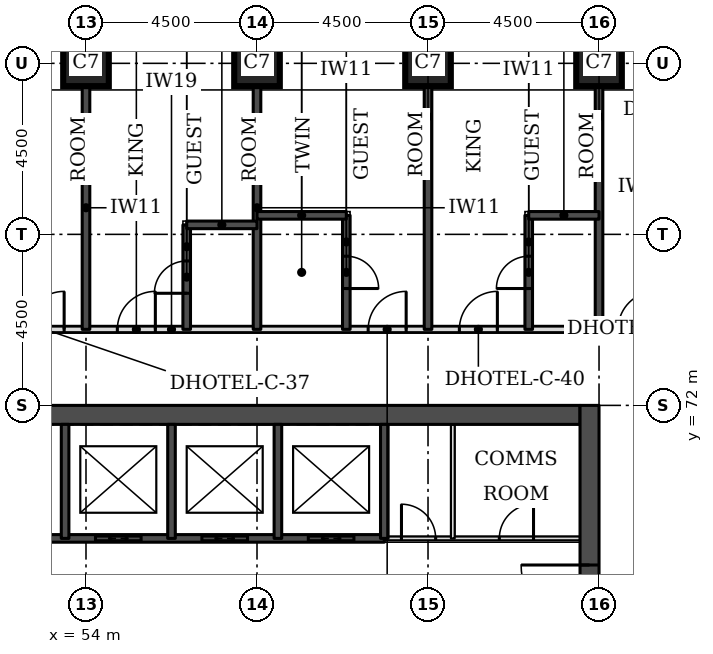
"""IFC4 building model, lengths in metres.
Left out: names, types, materials, properties, quantities, classifications, styles, units other than length and angle.
Written with IfcOpenShell. Run it as: python <this file> out.ifc"""

import sys

from ifc_helpers import new_model, si_unit, direction, frame, frame_2d, origin, origin_2d, place, context, subcontext, project, spatial, rectangle, extrude, element, fill, save


model = new_model("IFC4")
c1 = context("Model", 3, precision=1e-05, world=origin(), true_north=direction((0.0, 1.0)))
c2 = subcontext(c1, "Body", "Model", "MODEL_VIEW")
j1 = project(units=[si_unit("LENGTHUNIT", "METRE"), si_unit("PLANEANGLEUNIT", "RADIAN")], contexts=[c1])
p1 = place(None, origin())
s1 = spatial("IfcSite", under=j1, at=p1, CompositionType="ELEMENT")
p2 = place(p1, origin())
s2 = spatial("IfcBuilding", under=s1, at=p2, CompositionType="ELEMENT")
p3 = place(p2, frame((0.0, 0.0, 33.0)))
s3 = spatial("IfcBuildingStorey", under=s2, at=p3, CompositionType="ELEMENT", Elevation=33.0)
for number, where, z_axis, x_axis in (
    (1, (54.0, 81.0, 0.0), (0.0, 0.0, 1.0), (1.0, 0.0, 0.0)),
    (2, (58.5, 81.0, 0.0), (0.0, 0.0, 1.0), (1.0, 0.0, 0.0)),
    (3, (63.0, 81.0, 0.0), (0.0, 0.0, 1.0), (1.0, 0.0, 0.0)),
    (4, (67.5, 81.0, 0.0), (0.0, 0.0, 1.0), (1.0, 0.0, 0.0)),
):
    element("IfcColumn", number, at=place(p3, frame(where, z_axis=z_axis, x_axis=x_axis)), inside=s3, PredefinedType="COLUMN", context=c2, shape_type="SweptSolid", body=[
        extrude(rectangle(XDim=1.2, YDim=1.2, at=origin_2d()), origin(), (0.0, 0.0, 1.0), 3.3),
    ])
p4 = place(p3, frame((45.5, 71.75, 0.0), z_axis=(0.0, 0.0, 1.0), x_axis=(1.0, 0.0, 0.0)))
e5 = element("IfcWall", 5, at=p4, inside=s3, PredefinedType="SHEAR", context=c2, shape_type="SweptSolid", body=[
    extrude(rectangle(XDim=21.5, YDim=0.5, at=frame_2d((10.75, 0.0))), origin(), (0.0, 0.0, 1.0), 3.3),
])
p5 = place(p3, frame((67.25, 49.5, 0.0), z_axis=(0.0, 0.0, 1.0), x_axis=(0.0, 1.0, 0.0)))
e6 = element("IfcWall", 6, at=p5, inside=s3, PredefinedType="SHEAR", context=c2, shape_type="SweptSolid", body=[
    extrude(rectangle(XDim=22.5, YDim=0.5, at=frame_2d((11.25, 0.0))), origin(), (0.0, 0.0, 1.0), 3.3),
])
p6 = place(p5, frame((4.2, 0.0, 0.0)))
e7 = element("IfcOpeningElement", 7, at=p6, cuts=e6, PredefinedType="OPENING", context=c2, shape_type="SweptSolid", body=[
    extrude(rectangle(XDim=1.8, YDim=2.1, at=frame_2d((0.9, 1.05))), frame((0.0, 0.26, 0.0), z_axis=(0.0, -1.0, 0.0), x_axis=(1.0, 0.0, 0.0)), (0.0, 0.0, 1.0), 0.52),
])
p7 = place(p5, frame((6.9, 0.0, 0.0)))
e8 = element("IfcOpeningElement", 8, at=p7, cuts=e6, PredefinedType="OPENING", context=c2, shape_type="SweptSolid", body=[
    extrude(rectangle(XDim=1.1, YDim=2.1, at=frame_2d((0.55, 1.05))), frame((0.0, 0.26, 0.0), z_axis=(0.0, -1.0, 0.0), x_axis=(1.0, 0.0, 0.0)), (0.0, 0.0, 1.0), 0.52),
])
p8 = place(p5, frame((13.6, 0.0, 0.0)))
e9 = element("IfcOpeningElement", 9, at=p8, cuts=e6, PredefinedType="OPENING", context=c2, shape_type="SweptSolid", body=[
    extrude(rectangle(XDim=1.1, YDim=2.1, at=frame_2d((0.55, 1.05))), frame((0.0, 0.26, 0.0), z_axis=(0.0, -1.0, 0.0), x_axis=(1.0, 0.0, 0.0)), (0.0, 0.0, 1.0), 0.52),
])
p9 = place(p5, frame((16.5, 0.0, 0.0)))
e10 = element("IfcOpeningElement", 10, at=p9, cuts=e6, PredefinedType="OPENING", context=c2, shape_type="SweptSolid", body=[
    extrude(rectangle(XDim=1.8, YDim=2.1, at=frame_2d((0.9, 1.05))), frame((0.0, 0.26, 0.0), z_axis=(0.0, -1.0, 0.0), x_axis=(1.0, 0.0, 0.0)), (0.0, 0.0, 1.0), 0.52),
])
p10 = place(p3, frame((43.0, 74.0, 0.0), z_axis=(0.0, 0.0, 1.0), x_axis=(1.0, 0.0, 0.0)))
e11 = element("IfcWall", 11, at=p10, inside=s3, PredefinedType="PARTITIONING", context=c2, shape_type="SweptSolid", body=[
    extrude(rectangle(XDim=26.5, YDim=0.15, at=frame_2d((13.25, 0.0))), origin(), (0.0, 0.0, 1.0), 3.08),
])
p11 = place(p10, frame((2.825, 0.0, 0.0)))
e12 = element("IfcOpeningElement", 12, at=p11, cuts=e11, PredefinedType="OPENING", context=c2, shape_type="SweptSolid", body=[
    extrude(rectangle(XDim=1.0, YDim=2.1, at=frame_2d((0.5, 1.05))), frame((0.0, 0.085, 0.0), z_axis=(0.0, -1.0, 0.0), x_axis=(1.0, 0.0, 0.0)), (0.0, 0.0, 1.0), 0.17),
])
p12 = place(p10, frame((9.425, 0.0, 0.0)))
e13 = element("IfcOpeningElement", 13, at=p12, cuts=e11, PredefinedType="OPENING", context=c2, shape_type="SweptSolid", body=[
    extrude(rectangle(XDim=1.0, YDim=2.1, at=frame_2d((0.5, 1.05))), frame((0.0, 0.085, 0.0), z_axis=(0.0, -1.0, 0.0), x_axis=(1.0, 0.0, 0.0)), (0.0, 0.0, 1.0), 0.17),
])
p13 = place(p10, frame((11.825, 0.0, 0.0)))
e14 = element("IfcOpeningElement", 14, at=p13, cuts=e11, PredefinedType="OPENING", context=c2, shape_type="SweptSolid", body=[
    extrude(rectangle(XDim=1.0, YDim=2.1, at=frame_2d((0.5, 1.05))), frame((0.0, 0.085, 0.0), z_axis=(0.0, -1.0, 0.0), x_axis=(1.0, 0.0, 0.0)), (0.0, 0.0, 1.0), 0.17),
])
p14 = place(p10, frame((18.425, 0.0, 0.0)))
e15 = element("IfcOpeningElement", 15, at=p14, cuts=e11, PredefinedType="OPENING", context=c2, shape_type="SweptSolid", body=[
    extrude(rectangle(XDim=1.0, YDim=2.1, at=frame_2d((0.5, 1.05))), frame((0.0, 0.085, 0.0), z_axis=(0.0, -1.0, 0.0), x_axis=(1.0, 0.0, 0.0)), (0.0, 0.0, 1.0), 0.17),
])
p15 = place(p10, frame((20.825, 0.0, 0.0)))
e16 = element("IfcOpeningElement", 16, at=p15, cuts=e11, PredefinedType="OPENING", context=c2, shape_type="SweptSolid", body=[
    extrude(rectangle(XDim=1.0, YDim=2.1, at=frame_2d((0.5, 1.05))), frame((0.0, 0.085, 0.0), z_axis=(0.0, -1.0, 0.0), x_axis=(1.0, 0.0, 0.0)), (0.0, 0.0, 1.0), 0.17),
])
p16 = place(p10, frame((0.5, 0.0, 0.0)))
e17 = element("IfcOpeningElement", 17, at=p16, cuts=e11, PredefinedType="OPENING", context=c2, shape_type="SweptSolid", body=[
    extrude(rectangle(XDim=1.0, YDim=2.1, at=frame_2d((0.5, 1.05))), frame((0.0, 0.085, 0.0), z_axis=(0.0, -1.0, 0.0), x_axis=(1.0, 0.0, 0.0)), (0.0, 0.0, 1.0), 0.17),
])
p17 = place(p10, frame((25.0, 0.0, 0.0)))
e18 = element("IfcOpeningElement", 18, at=p17, cuts=e11, PredefinedType="OPENING", context=c2, shape_type="SweptSolid", body=[
    extrude(rectangle(XDim=1.0, YDim=2.1, at=frame_2d((0.5, 1.05))), frame((0.0, 0.085, 0.0), z_axis=(0.0, -1.0, 0.0), x_axis=(1.0, 0.0, 0.0)), (0.0, 0.0, 1.0), 0.17),
])
p18 = place(p3, frame((54.0, 74.0, 0.0), z_axis=(0.0, 0.0, 1.0), x_axis=(0.0, 1.0, 0.0)))
e19 = element("IfcWall", 19, at=p18, inside=s3, PredefinedType="SOLIDWALL", context=c2, shape_type="SweptSolid", body=[
    extrude(rectangle(XDim=6.4, YDim=0.2, at=frame_2d((3.2, 0.0))), origin(), (0.0, 0.0, 1.0), 3.08),
])
p19 = place(p3, frame((56.65, 74.0, 0.0), z_axis=(0.0, 0.0, 1.0), x_axis=(0.0, 1.0, 0.0)))
e20 = element("IfcWall", 20, at=p19, inside=s3, PredefinedType="SOLIDWALL", context=c2, shape_type="SweptSolid", body=[
    extrude(rectangle(XDim=2.75, YDim=0.2, at=frame_2d((1.375, 0.0))), origin(), (0.0, 0.0, 1.0), 3.08),
])
p20 = place(p19, frame((0.95, 0.0, 0.0)))
e21 = element("IfcOpeningElement", 21, at=p20, cuts=e20, PredefinedType="OPENING", context=c2, shape_type="SweptSolid", body=[
    extrude(rectangle(XDim=0.85, YDim=2.1, at=frame_2d((0.425, 1.05))), frame((0.0, 0.11, 0.0), z_axis=(0.0, -1.0, 0.0), x_axis=(1.0, 0.0, 0.0)), (0.0, 0.0, 1.0), 0.22),
])
p21 = place(p3, frame((58.5, 74.0, 0.0), z_axis=(0.0, 0.0, 1.0), x_axis=(0.0, 1.0, 0.0)))
e22 = element("IfcWall", 22, at=p21, inside=s3, PredefinedType="SOLIDWALL", context=c2, shape_type="SweptSolid", body=[
    extrude(rectangle(XDim=6.4, YDim=0.2, at=frame_2d((3.2, 0.0))), origin(), (0.0, 0.0, 1.0), 3.08),
])
p22 = place(p3, frame((60.85, 74.0, 0.0), z_axis=(0.0, 0.0, 1.0), x_axis=(0.0, 1.0, 0.0)))
e23 = element("IfcWall", 23, at=p22, inside=s3, PredefinedType="SOLIDWALL", context=c2, shape_type="SweptSolid", body=[
    extrude(rectangle(XDim=3.0, YDim=0.2, at=frame_2d((1.5, 0.0))), origin(), (0.0, 0.0, 1.0), 3.08),
])
p23 = place(p22, frame((1.075, 0.0, 0.0)))
e24 = element("IfcOpeningElement", 24, at=p23, cuts=e23, PredefinedType="OPENING", context=c2, shape_type="SweptSolid", body=[
    extrude(rectangle(XDim=0.85, YDim=2.1, at=frame_2d((0.425, 1.05))), frame((0.0, 0.11, 0.0), z_axis=(0.0, -1.0, 0.0), x_axis=(1.0, 0.0, 0.0)), (0.0, 0.0, 1.0), 0.22),
])
p24 = place(p3, frame((63.0, 74.0, 0.0), z_axis=(0.0, 0.0, 1.0), x_axis=(0.0, 1.0, 0.0)))
e25 = element("IfcWall", 25, at=p24, inside=s3, PredefinedType="SOLIDWALL", context=c2, shape_type="SweptSolid", body=[
    extrude(rectangle(XDim=6.4, YDim=0.2, at=frame_2d((3.2, 0.0))), origin(), (0.0, 0.0, 1.0), 3.08),
])
p25 = place(p3, frame((65.65, 74.0, 0.0), z_axis=(0.0, 0.0, 1.0), x_axis=(0.0, 1.0, 0.0)))
e26 = element("IfcWall", 26, at=p25, inside=s3, PredefinedType="SOLIDWALL", context=c2, shape_type="SweptSolid", body=[
    extrude(rectangle(XDim=3.0, YDim=0.2, at=frame_2d((1.5, 0.0))), origin(), (0.0, 0.0, 1.0), 3.08),
])
p26 = place(p25, frame((1.075, 0.0, 0.0)))
e27 = element("IfcOpeningElement", 27, at=p26, cuts=e26, PredefinedType="OPENING", context=c2, shape_type="SweptSolid", body=[
    extrude(rectangle(XDim=0.85, YDim=2.1, at=frame_2d((0.425, 1.05))), frame((0.0, 0.11, 0.0), z_axis=(0.0, -1.0, 0.0), x_axis=(1.0, 0.0, 0.0)), (0.0, 0.0, 1.0), 0.22),
])
p27 = place(p3, frame((67.5, 74.0, 0.0), z_axis=(0.0, 0.0, 1.0), x_axis=(0.0, 1.0, 0.0)))
e28 = element("IfcWall", 28, at=p27, inside=s3, PredefinedType="SOLIDWALL", context=c2, shape_type="SweptSolid", body=[
    extrude(rectangle(XDim=6.4, YDim=0.2, at=frame_2d((3.2, 0.0))), origin(), (0.0, 0.0, 1.0), 3.08),
])
p28 = place(p3, frame((56.65, 76.75, 0.0), z_axis=(0.0, 0.0, 1.0), x_axis=(1.0, 0.0, 0.0)))
e29 = element("IfcWall", 29, at=p28, inside=s3, PredefinedType="SOLIDWALL", context=c2, shape_type="SweptSolid", body=[
    extrude(rectangle(XDim=1.85, YDim=0.2, at=frame_2d((0.925, 0.0))), origin(), (0.0, 0.0, 1.0), 3.08),
])
p29 = place(p3, frame((58.5, 77.0, 0.0), z_axis=(0.0, 0.0, 1.0), x_axis=(1.0, 0.0, 0.0)))
e30 = element("IfcWall", 30, at=p29, inside=s3, PredefinedType="SOLIDWALL", context=c2, shape_type="SweptSolid", body=[
    extrude(rectangle(XDim=2.35, YDim=0.2, at=frame_2d((1.175, 0.0))), origin(), (0.0, 0.0, 1.0), 3.08),
])
p30 = place(p3, frame((65.65, 77.0, 0.0), z_axis=(0.0, 0.0, 1.0), x_axis=(1.0, 0.0, 0.0)))
e31 = element("IfcWall", 31, at=p30, inside=s3, PredefinedType="SOLIDWALL", context=c2, shape_type="SweptSolid", body=[
    extrude(rectangle(XDim=1.85, YDim=0.2, at=frame_2d((0.925, 0.0))), origin(), (0.0, 0.0, 1.0), 3.08),
])
p31 = place(p3, frame((61.85, 68.5, 0.0), z_axis=(0.0, 0.0, 1.0), x_axis=(1.0, 0.0, 0.0)))
e32 = element("IfcWall", 32, at=p31, inside=s3, PredefinedType="PARTITIONING", context=c2, shape_type="SweptSolid", body=[
    extrude(rectangle(XDim=5.15, YDim=0.1, at=frame_2d((2.575, 0.0))), origin(), (0.0, 0.0, 1.0), 3.08),
])
p32 = place(p31, frame((3.026, 0.0, 0.0)))
e33 = element("IfcOpeningElement", 33, at=p32, cuts=e32, PredefinedType="OPENING", context=c2, shape_type="SweptSolid", body=[
    extrude(rectangle(XDim=0.9, YDim=2.1, at=frame_2d((0.45, 1.05))), frame((0.0, 0.06, 0.0), z_axis=(0.0, -1.0, 0.0), x_axis=(1.0, 0.0, 0.0)), (0.0, 0.0, 1.0), 0.12),
])
p33 = place(p31, frame((0.451, 0.0, 0.0)))
e34 = element("IfcOpeningElement", 34, at=p33, cuts=e32, PredefinedType="OPENING", context=c2, shape_type="SweptSolid", body=[
    extrude(rectangle(XDim=0.9, YDim=2.1, at=frame_2d((0.45, 1.05))), frame((0.0, 0.06, 0.0), z_axis=(0.0, -1.0, 0.0), x_axis=(1.0, 0.0, 0.0)), (0.0, 0.0, 1.0), 0.12),
])
p34 = place(p3, frame((50.65, 68.5, 0.0), z_axis=(0.0, 0.0, 1.0), x_axis=(1.0, 0.0, 0.0)))
e35 = element("IfcWall", 35, at=p34, inside=s3, PredefinedType="SOLIDWALL", context=c2, shape_type="SweptSolid", body=[
    extrude(rectangle(XDim=11.2, YDim=0.2, at=frame_2d((5.6, 0.0))), origin(), (0.0, 0.0, 1.0), 3.08),
])
p35 = place(p34, frame((0.8, 0.0, 0.0)))
e36 = element("IfcOpeningElement", 36, at=p35, cuts=e35, PredefinedType="OPENING", context=c2, shape_type="SweptSolid", body=[
    extrude(rectangle(XDim=1.2, YDim=2.1, at=frame_2d((0.6, 1.05))), frame((0.0, 0.11, 0.0), z_axis=(0.0, -1.0, 0.0), x_axis=(1.0, 0.0, 0.0)), (0.0, 0.0, 1.0), 0.22),
])
p36 = place(p34, frame((3.6, 0.0, 0.0)))
e37 = element("IfcOpeningElement", 37, at=p36, cuts=e35, PredefinedType="OPENING", context=c2, shape_type="SweptSolid", body=[
    extrude(rectangle(XDim=1.2, YDim=2.1, at=frame_2d((0.6, 1.05))), frame((0.0, 0.11, 0.0), z_axis=(0.0, -1.0, 0.0), x_axis=(1.0, 0.0, 0.0)), (0.0, 0.0, 1.0), 0.22),
])
p37 = place(p34, frame((6.4, 0.0, 0.0)))
e38 = element("IfcOpeningElement", 38, at=p37, cuts=e35, PredefinedType="OPENING", context=c2, shape_type="SweptSolid", body=[
    extrude(rectangle(XDim=1.2, YDim=2.1, at=frame_2d((0.6, 1.05))), frame((0.0, 0.11, 0.0), z_axis=(0.0, -1.0, 0.0), x_axis=(1.0, 0.0, 0.0)), (0.0, 0.0, 1.0), 0.22),
])
p38 = place(p34, frame((9.2, 0.0, 0.0)))
e39 = element("IfcOpeningElement", 39, at=p38, cuts=e35, PredefinedType="OPENING", context=c2, shape_type="SweptSolid", body=[
    extrude(rectangle(XDim=1.2, YDim=2.1, at=frame_2d((0.6, 1.05))), frame((0.0, 0.11, 0.0), z_axis=(0.0, -1.0, 0.0), x_axis=(1.0, 0.0, 0.0)), (0.0, 0.0, 1.0), 0.22),
])
for number, where, z_axis, x_axis in (
    (40, (53.45, 68.5, 0.0), (0.0, 0.0, 1.0), (0.0, 1.0, 0.0)),
    (41, (56.25, 68.5, 0.0), (0.0, 0.0, 1.0), (0.0, 1.0, 0.0)),
    (42, (59.05, 68.5, 0.0), (0.0, 0.0, 1.0), (0.0, 1.0, 0.0)),
    (43, (61.85, 68.5, 0.0), (0.0, 0.0, 1.0), (0.0, 1.0, 0.0)),
):
    element("IfcWall", number, at=place(p3, frame(where, z_axis=z_axis, x_axis=x_axis)), inside=s3, PredefinedType="SOLIDWALL", context=c2, shape_type="SweptSolid", body=[
        extrude(rectangle(XDim=3.0, YDim=0.2, at=frame_2d((1.5, 0.0))), origin(), (0.0, 0.0, 1.0), 3.08),
    ])
p39 = place(p3, frame((63.653, 68.5, 0.0), z_axis=(0.0, 0.0, 1.0), x_axis=(0.0, 1.0, 0.0)))
e44 = element("IfcWall", 44, at=p39, inside=s3, PredefinedType="PARTITIONING", context=c2, shape_type="SweptSolid", body=[
    extrude(rectangle(XDim=3.0, YDim=0.1, at=frame_2d((1.5, 0.0))), origin(), (0.0, 0.0, 1.0), 3.08),
])
p40 = place(p12, origin())
e45 = element("IfcDoor", 45, at=p40, inside=s3, OperationType="SINGLE_SWING_RIGHT", PredefinedType="DOOR", context=c2, shape_type="SweptSolid", body=[
    extrude(rectangle(XDim=1.0, YDim=2.1, at=frame_2d((0.5, 1.05))), frame((0.0, 0.025, 0.0), z_axis=(0.0, -1.0, 0.0), x_axis=(1.0, 0.0, 0.0)), (0.0, 0.0, 1.0), 0.05),
])
fill(e13, e45)
p41 = place(p13, origin())
e46 = element("IfcDoor", 46, at=p41, inside=s3, OperationType="SINGLE_SWING_RIGHT", PredefinedType="DOOR", context=c2, shape_type="SweptSolid", body=[
    extrude(rectangle(XDim=1.0, YDim=2.1, at=frame_2d((0.5, 1.05))), frame((0.0, 0.025, 0.0), z_axis=(0.0, -1.0, 0.0), x_axis=(1.0, 0.0, 0.0)), (0.0, 0.0, 1.0), 0.05),
])
fill(e14, e46)
p42 = place(p20, origin())
e47 = element("IfcDoor", 47, at=p42, inside=s3, OperationType="SINGLE_SWING_LEFT", PredefinedType="DOOR", context=c2, shape_type="SweptSolid", body=[
    extrude(rectangle(XDim=0.85, YDim=2.1, at=frame_2d((0.425, 1.05))), frame((0.0, 0.025, 0.0), z_axis=(0.0, -1.0, 0.0), x_axis=(1.0, 0.0, 0.0)), (0.0, 0.0, 1.0), 0.05),
])
fill(e21, e47)
p43 = place(p14, origin())
e48 = element("IfcDoor", 48, at=p43, inside=s3, OperationType="SINGLE_SWING_RIGHT", PredefinedType="DOOR", context=c2, shape_type="SweptSolid", body=[
    extrude(rectangle(XDim=1.0, YDim=2.1, at=frame_2d((0.5, 1.05))), frame((0.0, 0.025, 0.0), z_axis=(0.0, -1.0, 0.0), x_axis=(1.0, 0.0, 0.0)), (0.0, 0.0, 1.0), 0.05),
])
fill(e15, e48)
p44 = place(p23, frame((0.85, 0.0, 0.0), z_axis=(0.0, 0.0, 1.0), x_axis=(-1.0, 0.0, 0.0)))
e49 = element("IfcDoor", 49, at=p44, inside=s3, OperationType="SINGLE_SWING_RIGHT", PredefinedType="DOOR", context=c2, shape_type="SweptSolid", body=[
    extrude(rectangle(XDim=0.85, YDim=2.1, at=frame_2d((0.425, 1.05))), frame((0.0, 0.025, 0.0), z_axis=(0.0, -1.0, 0.0), x_axis=(1.0, 0.0, 0.0)), (0.0, 0.0, 1.0), 0.05),
])
fill(e24, e49)
p45 = place(p15, origin())
e50 = element("IfcDoor", 50, at=p45, inside=s3, OperationType="SINGLE_SWING_RIGHT", PredefinedType="DOOR", context=c2, shape_type="SweptSolid", body=[
    extrude(rectangle(XDim=1.0, YDim=2.1, at=frame_2d((0.5, 1.05))), frame((0.0, 0.025, 0.0), z_axis=(0.0, -1.0, 0.0), x_axis=(1.0, 0.0, 0.0)), (0.0, 0.0, 1.0), 0.05),
])
fill(e16, e50)
p46 = place(p26, origin())
e51 = element("IfcDoor", 51, at=p46, inside=s3, OperationType="SINGLE_SWING_LEFT", PredefinedType="DOOR", context=c2, shape_type="SweptSolid", body=[
    extrude(rectangle(XDim=0.85, YDim=2.1, at=frame_2d((0.425, 1.05))), frame((0.0, 0.025, 0.0), z_axis=(0.0, -1.0, 0.0), x_axis=(1.0, 0.0, 0.0)), (0.0, 0.0, 1.0), 0.05),
])
fill(e27, e51)
p47 = place(p17, origin())
e52 = element("IfcDoor", 52, at=p47, inside=s3, OperationType="SINGLE_SWING_RIGHT", PredefinedType="DOOR", context=c2, shape_type="SweptSolid", body=[
    extrude(rectangle(XDim=1.0, YDim=2.1, at=frame_2d((0.5, 1.05))), frame((0.0, 0.025, 0.0), z_axis=(0.0, -1.0, 0.0), x_axis=(1.0, 0.0, 0.0)), (0.0, 0.0, 1.0), 0.05),
])
fill(e18, e52)
p48 = place(p36, origin())
e53 = element("IfcDoor", 53, at=p48, inside=s3, OperationType="DOUBLE_DOOR_SLIDING", PredefinedType="DOOR", context=c2, shape_type="SweptSolid", body=[
    extrude(rectangle(XDim=1.2, YDim=2.1, at=frame_2d((0.6, 1.05))), frame((0.0, 0.025, 0.0), z_axis=(0.0, -1.0, 0.0), x_axis=(1.0, 0.0, 0.0)), (0.0, 0.0, 1.0), 0.05),
])
fill(e37, e53)
p49 = place(p37, origin())
e54 = element("IfcDoor", 54, at=p49, inside=s3, OperationType="DOUBLE_DOOR_SLIDING", PredefinedType="DOOR", context=c2, shape_type="SweptSolid", body=[
    extrude(rectangle(XDim=1.2, YDim=2.1, at=frame_2d((0.6, 1.05))), frame((0.0, 0.025, 0.0), z_axis=(0.0, -1.0, 0.0), x_axis=(1.0, 0.0, 0.0)), (0.0, 0.0, 1.0), 0.05),
])
fill(e38, e54)
p50 = place(p38, origin())
e55 = element("IfcDoor", 55, at=p50, inside=s3, OperationType="DOUBLE_DOOR_SLIDING", PredefinedType="DOOR", context=c2, shape_type="SweptSolid", body=[
    extrude(rectangle(XDim=1.2, YDim=2.1, at=frame_2d((0.6, 1.05))), frame((0.0, 0.025, 0.0), z_axis=(0.0, -1.0, 0.0), x_axis=(1.0, 0.0, 0.0)), (0.0, 0.0, 1.0), 0.05),
])
fill(e39, e55)
p51 = place(p9, origin())
e56 = element("IfcDoor", 56, at=p51, inside=s3, OperationType="SINGLE_SWING_RIGHT", PredefinedType="DOOR", context=c2, shape_type="SweptSolid", body=[
    extrude(rectangle(XDim=1.8, YDim=2.1, at=frame_2d((0.9, 1.05))), frame((0.0, 0.025, 0.0), z_axis=(0.0, -1.0, 0.0), x_axis=(1.0, 0.0, 0.0)), (0.0, 0.0, 1.0), 0.05),
])
fill(e10, e56)
p52 = place(p32, origin())
e57 = element("IfcDoor", 57, at=p52, inside=s3, OperationType="SINGLE_SWING_RIGHT", PredefinedType="DOOR", context=c2, shape_type="SweptSolid", body=[
    extrude(rectangle(XDim=0.9, YDim=2.1, at=frame_2d((0.45, 1.05))), frame((0.0, 0.025, 0.0), z_axis=(0.0, -1.0, 0.0), x_axis=(1.0, 0.0, 0.0)), (0.0, 0.0, 1.0), 0.05),
])
fill(e33, e57)
p53 = place(p33, origin())
e58 = element("IfcDoor", 58, at=p53, inside=s3, OperationType="SINGLE_SWING_LEFT", PredefinedType="DOOR", context=c2, shape_type="SweptSolid", body=[
    extrude(rectangle(XDim=0.9, YDim=2.1, at=frame_2d((0.45, 1.05))), frame((0.0, 0.025, 0.0), z_axis=(0.0, -1.0, 0.0), x_axis=(1.0, 0.0, 0.0)), (0.0, 0.0, 1.0), 0.05),
])
fill(e34, e58)
save(model, sys.argv[1])
